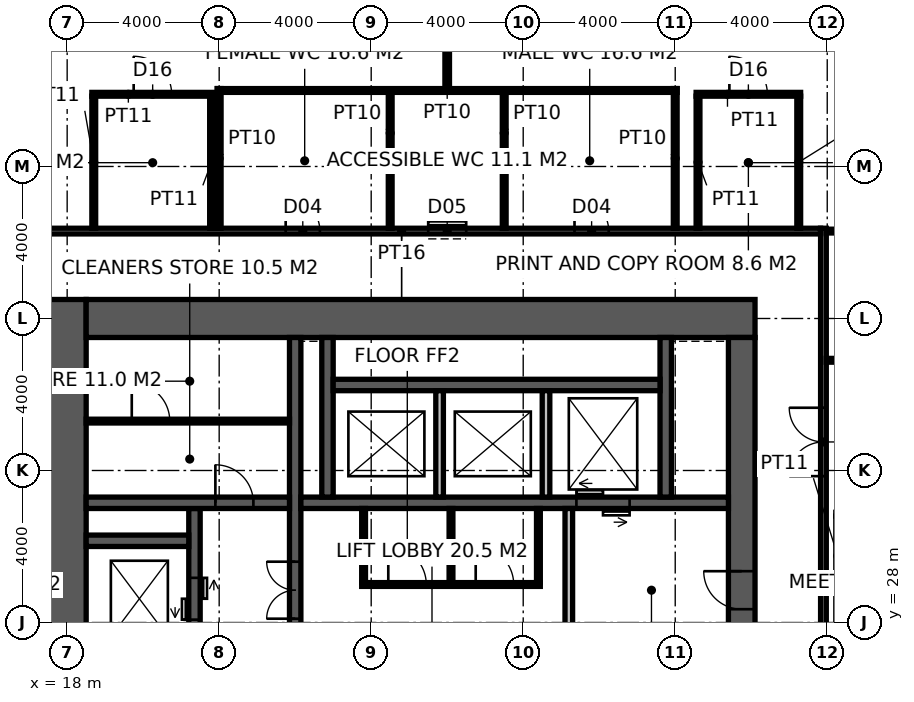
"""IFC4 building model, lengths in metres.
Left out: names, types, materials, properties, quantities, classifications, styles, units other than length and angle.
Written with IfcOpenShell. Run it as: python <this file> out.ifc"""

import sys

from ifc_helpers import new_model, si_unit, direction, frame, frame_2d, origin, place, context, subcontext, project, spatial, rectangle, extrude, element, fill, save


model = new_model("IFC4")
c1 = context("Model", 3, precision=1e-05, world=origin(), true_north=direction((0.0, 1.0)))
c2 = subcontext(c1, "Body", "Model", "MODEL_VIEW")
j1 = project(units=[si_unit("LENGTHUNIT", "METRE"), si_unit("PLANEANGLEUNIT", "RADIAN")], contexts=[c1])
p1 = place(None, origin())
s1 = spatial("IfcSite", under=j1, at=p1, CompositionType="ELEMENT")
p2 = place(p1, origin())
s2 = spatial("IfcBuilding", under=s1, at=p2, CompositionType="ELEMENT")
p3 = place(p2, frame((0.0, 0.0, 101.4)))
s3 = spatial("IfcBuildingStorey", under=s2, at=p3, CompositionType="ELEMENT", Elevation=101.4)
p4 = place(p3, frame((18.0, 17.5, -0.15), z_axis=(0.0, 0.0, 1.0), x_axis=(0.0, 1.0, 0.0)))
e1 = element("IfcWall", 1, at=p4, inside=s3, PredefinedType="SHEAR", context=c2, shape_type="SweptSolid", body=[
    extrude(rectangle(XDim=19.0, YDim=1.0, at=frame_2d((9.5, 0.0))), origin(), (0.0, 0.0, 1.0), 4.0),
])
p5 = place(p3, frame((18.5, 36.0, -0.15), z_axis=(0.0, 0.0, 1.0), x_axis=(1.0, 0.0, 0.0)))
e2 = element("IfcWall", 2, at=p5, inside=s3, PredefinedType="SHEAR", context=c2, shape_type="SweptSolid", body=[
    extrude(rectangle(XDim=17.6, YDim=1.0, at=frame_2d((8.8, 0.0))), origin(), (0.0, 0.0, 1.0), 4.0),
])
p6 = place(p3, frame((35.75, 18.5, -0.15), z_axis=(0.0, 0.0, 1.0), x_axis=(0.0, 1.0, 0.0)))
e3 = element("IfcWall", 3, at=p6, inside=s3, PredefinedType="SHEAR", context=c2, shape_type="SweptSolid", body=[
    extrude(rectangle(XDim=17.0, YDim=0.7, at=frame_2d((8.5, 0.0))), origin(), (0.0, 0.0, 1.0), 4.0),
])
p7 = place(p6, frame((9.85, 0.0, 0.15)))
e4 = element("IfcOpeningElement", 4, at=p7, cuts=e3, PredefinedType="OPENING", context=c2, shape_type="SweptSolid", body=[
    extrude(rectangle(XDim=1.0, YDim=2.2, at=frame_2d((0.5, 1.1))), frame((0.0, 0.36, 0.0), z_axis=(0.0, -1.0, 0.0), x_axis=(1.0, 0.0, 0.0)), (0.0, 0.0, 1.0), 0.72),
])
p8 = place(p3, frame((24.0, 18.5, -0.15), z_axis=(0.0, 0.0, 1.0), x_axis=(0.0, 1.0, 0.0)))
e5 = element("IfcWall", 5, at=p8, inside=s3, PredefinedType="SHEAR", context=c2, shape_type="SweptSolid", body=[
    extrude(rectangle(XDim=17.0, YDim=0.3, at=frame_2d((8.5, 0.0))), origin(), (0.0, 0.0, 1.0), 4.0),
])
p9 = place(p8, frame((9.6, 0.0, 0.15)))
e6 = element("IfcOpeningElement", 6, at=p9, cuts=e5, PredefinedType="OPENING", context=c2, shape_type="SweptSolid", body=[
    extrude(rectangle(XDim=1.5, YDim=2.4, at=frame_2d((0.75, 1.2))), frame((0.0, 0.16, 0.0), z_axis=(0.0, -1.0, 0.0), x_axis=(1.0, 0.0, 0.0)), (0.0, 0.0, 1.0), 0.32),
])
p10 = place(p3, frame((24.15, 31.15, -0.15), z_axis=(0.0, 0.0, 1.0), x_axis=(1.0, 0.0, 0.0)))
e7 = element("IfcWall", 7, at=p10, inside=s3, PredefinedType="SHEAR", context=c2, shape_type="SweptSolid", body=[
    extrude(rectangle(XDim=11.25, YDim=0.3, at=frame_2d((5.625, 0.0))), origin(), (0.0, 0.0, 1.0), 4.0),
])
p11 = place(p10, frame((7.25, 0.0, 0.15)))
e8 = element("IfcOpeningElement", 8, at=p11, cuts=e7, PredefinedType="OPENING", context=c2, shape_type="SweptSolid", body=[
    extrude(rectangle(XDim=1.4, YDim=2.4, at=frame_2d((0.7, 1.2))), frame((0.0, 0.16, 0.0), z_axis=(0.0, -1.0, 0.0), x_axis=(1.0, 0.0, 0.0)), (0.0, 0.0, 1.0), 0.32),
])
p12 = place(p3, frame((21.35, 18.5, -0.15), z_axis=(0.0, 0.0, 1.0), x_axis=(0.0, 1.0, 0.0)))
e9 = element("IfcWall", 9, at=p12, inside=s3, PredefinedType="SHEAR", context=c2, shape_type="SweptSolid", body=[
    extrude(rectangle(XDim=12.5, YDim=0.3, at=frame_2d((6.25, 0.0))), origin(), (0.0, 0.0, 1.0), 4.0),
])
p13 = place(p12, frame((0.875, 0.0, 0.15)))
e10 = element("IfcOpeningElement", 10, at=p13, cuts=e9, PredefinedType="OPENING", context=c2, shape_type="SweptSolid", body=[
    extrude(rectangle(XDim=1.1, YDim=2.2, at=frame_2d((0.55, 1.1))), frame((0.0, 0.16, 0.0), z_axis=(0.0, -1.0, 0.0), x_axis=(1.0, 0.0, 0.0)), (0.0, 0.0, 1.0), 0.32),
])
p14 = place(p12, frame((3.825, 0.0, 0.15)))
e11 = element("IfcOpeningElement", 11, at=p14, cuts=e9, PredefinedType="OPENING", context=c2, shape_type="SweptSolid", body=[
    extrude(rectangle(XDim=1.1, YDim=2.2, at=frame_2d((0.55, 1.1))), frame((0.0, 0.16, 0.0), z_axis=(0.0, -1.0, 0.0), x_axis=(1.0, 0.0, 0.0)), (0.0, 0.0, 1.0), 0.32),
])
p15 = place(p12, frame((6.675, 0.0, 0.15)))
e12 = element("IfcOpeningElement", 12, at=p15, cuts=e9, PredefinedType="OPENING", context=c2, shape_type="SweptSolid", body=[
    extrude(rectangle(XDim=1.1, YDim=2.2, at=frame_2d((0.55, 1.1))), frame((0.0, 0.16, 0.0), z_axis=(0.0, -1.0, 0.0), x_axis=(1.0, 0.0, 0.0)), (0.0, 0.0, 1.0), 0.32),
])
p16 = place(p12, frame((9.575, 0.0, 0.15)))
e13 = element("IfcOpeningElement", 13, at=p16, cuts=e9, PredefinedType="OPENING", context=c2, shape_type="SweptSolid", body=[
    extrude(rectangle(XDim=1.1, YDim=2.2, at=frame_2d((0.55, 1.1))), frame((0.0, 0.16, 0.0), z_axis=(0.0, -1.0, 0.0), x_axis=(1.0, 0.0, 0.0)), (0.0, 0.0, 1.0), 0.32),
])
p17 = place(p3, frame((18.5, 31.15, -0.15), z_axis=(0.0, 0.0, 1.0), x_axis=(1.0, 0.0, 0.0)))
e14 = element("IfcWall", 14, at=p17, inside=s3, PredefinedType="SHEAR", context=c2, shape_type="SweptSolid", body=[
    extrude(rectangle(XDim=5.35, YDim=0.3, at=frame_2d((2.675, 0.0))), origin(), (0.0, 0.0, 1.0), 4.0),
])
p18 = place(p17, frame((3.4, 0.0, 0.15)))
e15 = element("IfcOpeningElement", 15, at=p18, cuts=e14, PredefinedType="OPENING", context=c2, shape_type="SweptSolid", body=[
    extrude(rectangle(XDim=1.0, YDim=2.2, at=frame_2d((0.5, 1.1))), frame((0.0, 0.16, 0.0), z_axis=(0.0, -1.0, 0.0), x_axis=(1.0, 0.0, 0.0)), (0.0, 0.0, 1.0), 0.32),
])
p19 = place(p3, frame((18.5, 30.15, -0.15), z_axis=(0.0, 0.0, 1.0), x_axis=(1.0, 0.0, 0.0)))
e16 = element("IfcWall", 16, at=p19, inside=s3, PredefinedType="SHEAR", context=c2, shape_type="SweptSolid", body=[
    extrude(rectangle(XDim=2.7, YDim=0.3, at=frame_2d((1.35, 0.0))), origin(), (0.0, 0.0, 1.0), 4.0),
])
for number, where, z_axis, x_axis in (
    (17, (24.85, 31.3, -0.15), (0.0, 0.0, 1.0), (0.0, 1.0, 0.0)),
    (18, (33.75, 31.3, -0.15), (0.0, 0.0, 1.0), (0.0, 1.0, 0.0)),
):
    element("IfcWall", number, at=place(p3, frame(where, z_axis=z_axis, x_axis=x_axis)), inside=s3, PredefinedType="SHEAR", context=c2, shape_type="SweptSolid", body=[
        extrude(rectangle(XDim=4.2, YDim=0.3, at=frame_2d((2.1, 0.0))), origin(), (0.0, 0.0, 1.0), 4.0),
    ])
p20 = place(p3, frame((25.0, 34.25, -0.15), z_axis=(0.0, 0.0, 1.0), x_axis=(1.0, 0.0, 0.0)))
e19 = element("IfcWall", 19, at=p20, inside=s3, PredefinedType="SHEAR", context=c2, shape_type="SweptSolid", body=[
    extrude(rectangle(XDim=8.6, YDim=0.3, at=frame_2d((4.3, 0.0))), origin(), (0.0, 0.0, 1.0), 4.0),
])
for number, where, z_axis, x_axis in (
    (20, (27.8, 31.3, -0.15), (0.0, 0.0, 1.0), (0.0, 1.0, 0.0)),
    (21, (30.6, 31.3, -0.15), (0.0, 0.0, 1.0), (0.0, 1.0, 0.0)),
):
    element("IfcWall", number, at=place(p3, frame(where, z_axis=z_axis, x_axis=x_axis)), inside=s3, PredefinedType="SOLIDWALL", context=c2, shape_type="SweptSolid", body=[
        extrude(rectangle(XDim=2.8, YDim=0.2, at=frame_2d((1.4, 0.0))), origin(), (0.0, 0.0, 1.0), 4.0),
    ])
p21 = place(p3, frame((31.2, 26.7, 0.0), z_axis=(0.0, 0.0, 1.0), x_axis=(0.0, 1.0, 0.0)))
e22 = element("IfcWall", 22, at=p21, inside=s3, PredefinedType="SOLIDWALL", context=c2, shape_type="SweptSolid", body=[
    extrude(rectangle(XDim=4.3, YDim=0.2, at=frame_2d((2.15, 0.0))), origin(), (0.0, 0.0, 1.0), 3.85),
])
p22 = place(p3, frame((18.5, 33.3, 0.0), z_axis=(0.0, 0.0, 1.0), x_axis=(1.0, 0.0, 0.0)))
e23 = element("IfcWall", 23, at=p22, inside=s3, PredefinedType="PARTITIONING", context=c2, shape_type="SweptSolid", body=[
    extrude(rectangle(XDim=5.35, YDim=0.1, at=frame_2d((2.675, 0.0))), origin(), (0.0, 0.0, 1.0), 3.85),
])
p23 = place(p22, frame((1.2, 0.0, 0.0)))
e24 = element("IfcOpeningElement", 24, at=p23, cuts=e23, PredefinedType="OPENING", context=c2, shape_type="SweptSolid", body=[
    extrude(rectangle(XDim=1.0, YDim=2.2, at=frame_2d((0.5, 1.1))), frame((0.0, 0.06, 0.0), z_axis=(0.0, -1.0, 0.0), x_axis=(1.0, 0.0, 0.0)), (0.0, 0.0, 1.0), 0.12),
])
p24 = place(p3, frame((25.75, 29.0, 0.0), z_axis=(0.0, 0.0, 1.0), x_axis=(1.0, 0.0, 0.0)))
e25 = element("IfcWall", 25, at=p24, inside=s3, PredefinedType="PARTITIONING", context=c2, shape_type="SweptSolid", body=[
    extrude(rectangle(XDim=4.7, YDim=0.1, at=frame_2d((2.35, 0.0))), origin(), (0.0, 0.0, 1.0), 3.85),
])
p25 = place(p24, frame((0.7, 0.0, 0.0)))
e26 = element("IfcOpeningElement", 26, at=p25, cuts=e25, PredefinedType="OPENING", context=c2, shape_type="SweptSolid", body=[
    extrude(rectangle(XDim=1.0, YDim=2.2, at=frame_2d((0.5, 1.1))), frame((0.0, 0.06, 0.0), z_axis=(0.0, -1.0, 0.0), x_axis=(1.0, 0.0, 0.0)), (0.0, 0.0, 1.0), 0.12),
])
p26 = place(p24, frame((3.0, 0.0, 0.0)))
e27 = element("IfcOpeningElement", 27, at=p26, cuts=e25, PredefinedType="OPENING", context=c2, shape_type="SweptSolid", body=[
    extrude(rectangle(XDim=1.0, YDim=2.2, at=frame_2d((0.5, 1.1))), frame((0.0, 0.06, 0.0), z_axis=(0.0, -1.0, 0.0), x_axis=(1.0, 0.0, 0.0)), (0.0, 0.0, 1.0), 0.12),
])
for number, where, z_axis, x_axis in (
    (28, (25.8, 29.05, 0.0), (0.0, 0.0, 1.0), (0.0, 1.0, 0.0)),
    (29, (30.4, 29.05, 0.0), (0.0, 0.0, 1.0), (0.0, 1.0, 0.0)),
    (30, (28.1, 29.05, 0.0), (0.0, 0.0, 1.0), (0.0, 1.0, 0.0)),
):
    element("IfcWall", number, at=place(p3, frame(where, z_axis=z_axis, x_axis=x_axis)), inside=s3, PredefinedType="PARTITIONING", context=c2, shape_type="SweptSolid", body=[
        extrude(rectangle(XDim=1.95, YDim=0.1, at=frame_2d((0.975, 0.0))), origin(), (0.0, 0.0, 1.0), 3.85),
    ])
p27 = place(p3, frame((37.9, 15.625, 0.0), z_axis=(0.0, 0.0, 1.0), x_axis=(0.0, 1.0, 0.0)))
e31 = element("IfcWall", 31, at=p27, inside=s3, PredefinedType="PARTITIONING", context=c2, shape_type="SweptSolid", body=[
    extrude(rectangle(XDim=22.75, YDim=0.15, at=frame_2d((11.375, 0.0))), origin(), (0.0, 0.0, 1.0), 2.65),
])
p28 = place(p27, frame((4.974, 0.0, 0.0)))
e32 = element("IfcOpeningElement", 32, at=p28, cuts=e31, PredefinedType="OPENING", context=c2, shape_type="SweptSolid", body=[
    extrude(rectangle(XDim=1.8, YDim=2.4, at=frame_2d((0.9, 1.2))), frame((0.0, 0.085, 0.0), z_axis=(0.0, -1.0, 0.0), x_axis=(1.0, 0.0, 0.0)), (0.0, 0.0, 1.0), 0.17),
])
p29 = place(p27, frame((16.226, 0.0, 0.0)))
e33 = element("IfcOpeningElement", 33, at=p29, cuts=e31, PredefinedType="OPENING", context=c2, shape_type="SweptSolid", body=[
    extrude(rectangle(XDim=1.8, YDim=2.4, at=frame_2d((0.9, 1.2))), frame((0.0, 0.085, 0.0), z_axis=(0.0, -1.0, 0.0), x_axis=(1.0, 0.0, 0.0)), (0.0, 0.0, 1.0), 0.17),
])
p30 = place(p3, frame((15.775, 38.3, 0.0), z_axis=(0.0, 0.0, 1.0), x_axis=(1.0, 0.0, 0.0)))
e34 = element("IfcWall", 34, at=p30, inside=s3, PredefinedType="PARTITIONING", context=c2, shape_type="SweptSolid", body=[
    extrude(rectangle(XDim=22.05, YDim=0.15, at=frame_2d((11.025, 0.0))), origin(), (0.0, 0.0, 1.0), 3.85),
])
p31 = place(p30, frame((7.975, 0.0, 0.0)))
e35 = element("IfcOpeningElement", 35, at=p31, cuts=e34, PredefinedType="OPENING", context=c2, shape_type="SweptSolid", body=[
    extrude(rectangle(XDim=0.9, YDim=2.1, at=frame_2d((0.45, 1.05))), frame((0.0, 0.085, 0.0), z_axis=(0.0, -1.0, 0.0), x_axis=(1.0, 0.0, 0.0)), (0.0, 0.0, 1.0), 0.17),
])
p32 = place(p30, frame((11.725, 0.0, 0.0)))
e36 = element("IfcOpeningElement", 36, at=p32, cuts=e34, PredefinedType="OPENING", context=c2, shape_type="SweptSolid", body=[
    extrude(rectangle(XDim=1.0, YDim=2.1, at=frame_2d((0.5, 1.05))), frame((0.0, 0.085, 0.0), z_axis=(0.0, -1.0, 0.0), x_axis=(1.0, 0.0, 0.0)), (0.0, 0.0, 1.0), 0.17),
])
p33 = place(p30, frame((15.575, 0.0, 0.0)))
e37 = element("IfcOpeningElement", 37, at=p33, cuts=e34, PredefinedType="OPENING", context=c2, shape_type="SweptSolid", body=[
    extrude(rectangle(XDim=0.9, YDim=2.1, at=frame_2d((0.45, 1.05))), frame((0.0, 0.085, 0.0), z_axis=(0.0, -1.0, 0.0), x_axis=(1.0, 0.0, 0.0)), (0.0, 0.0, 1.0), 0.17),
])
for number, where, z_axis, x_axis in (
    (38, (22.0, 38.375, 0.0), (0.0, 0.0, 1.0), (0.0, 1.0, 0.0)),
    (39, (34.0, 38.375, 0.0), (0.0, 0.0, 1.0), (0.0, 1.0, 0.0)),
):
    element("IfcWall", number, at=place(p3, frame(where, z_axis=z_axis, x_axis=x_axis)), inside=s3, PredefinedType="PARTITIONING", context=c2, shape_type="SweptSolid", body=[
        extrude(rectangle(XDim=3.675, YDim=0.1, at=frame_2d((1.837, 0.0))), origin(), (0.0, 0.0, 1.0), 2.65),
    ])
p34 = place(p3, frame((21.95, 42.0, 0.0), z_axis=(0.0, 0.0, 1.0), x_axis=(1.0, 0.0, 0.0)))
e40 = element("IfcWall", 40, at=p34, inside=s3, PredefinedType="PARTITIONING", context=c2, shape_type="SweptSolid", body=[
    extrude(rectangle(XDim=12.1, YDim=0.1, at=frame_2d((6.05, 0.0))), origin(), (0.0, 0.0, 1.0), 3.85),
])
for number, where, z_axis, x_axis in (
    (41, (26.5, 38.375, 0.0), (0.0, 0.0, 1.0), (0.0, 1.0, 0.0)),
    (42, (29.5, 38.375, 0.0), (0.0, 0.0, 1.0), (0.0, 1.0, 0.0)),
):
    element("IfcWall", number, at=place(p3, frame(where, z_axis=z_axis, x_axis=x_axis)), inside=s3, PredefinedType="PARTITIONING", context=c2, shape_type="SweptSolid", body=[
        extrude(rectangle(XDim=3.575, YDim=0.1, at=frame_2d((1.788, 0.0))), origin(), (0.0, 0.0, 1.0), 2.65),
    ])
p35 = place(p3, frame((28.0, 42.05, 0.0), z_axis=(0.0, 0.0, 1.0), x_axis=(0.0, 1.0, 0.0)))
e43 = element("IfcWall", 43, at=p35, inside=s3, PredefinedType="PARTITIONING", context=c2, shape_type="SweptSolid", body=[
    extrude(rectangle(XDim=5.65, YDim=0.12, at=frame_2d((2.825, 0.0))), origin(), (0.0, 0.0, 1.0), 3.85),
])
for number, where, z_axis, x_axis in (
    (44, (37.975, 34.9, 0.0), (0.0, 0.0, 1.0), (1.0, 0.0, 0.0)),
    (45, (37.975, 38.3, 0.0), (0.0, 0.0, 1.0), (1.0, 0.0, 0.0)),
):
    element("IfcWall", number, at=place(p3, frame(where, z_axis=z_axis, x_axis=x_axis)), inside=s3, PredefinedType="PARTITIONING", context=c2, shape_type="SweptSolid", body=[
        extrude(rectangle(XDim=4.775, YDim=0.1, at=frame_2d((2.387, 0.0))), origin(), (0.0, 0.0, 1.0), 3.85),
    ])
p36 = place(p3, frame((18.65, 41.9, 0.0), z_axis=(0.0, 0.0, 1.0), x_axis=(1.0, 0.0, 0.0)))
e46 = element("IfcWall", 46, at=p36, inside=s3, PredefinedType="PARTITIONING", context=c2, shape_type="SweptSolid", body=[
    extrude(rectangle(XDim=3.2, YDim=0.1, at=frame_2d((1.6, 0.0))), origin(), (0.0, 0.0, 1.0), 3.85),
])
p37 = place(p36, frame((1.1, 0.0, 0.0)))
e47 = element("IfcOpeningElement", 47, at=p37, cuts=e46, PredefinedType="OPENING", context=c2, shape_type="SweptSolid", body=[
    extrude(rectangle(XDim=1.0, YDim=2.2, at=frame_2d((0.5, 1.1))), frame((0.0, 0.06, 0.0), z_axis=(0.0, -1.0, 0.0), x_axis=(1.0, 0.0, 0.0)), (0.0, 0.0, 1.0), 0.12),
])
p38 = place(p3, frame((34.55, 41.9, 0.0), z_axis=(0.0, 0.0, 1.0), x_axis=(1.0, 0.0, 0.0)))
e48 = element("IfcWall", 48, at=p38, inside=s3, PredefinedType="PARTITIONING", context=c2, shape_type="SweptSolid", body=[
    extrude(rectangle(XDim=2.75, YDim=0.1, at=frame_2d((1.375, 0.0))), origin(), (0.0, 0.0, 1.0), 3.85),
])
p39 = place(p38, frame((0.875, 0.0, 0.0)))
e49 = element("IfcOpeningElement", 49, at=p39, cuts=e48, PredefinedType="OPENING", context=c2, shape_type="SweptSolid", body=[
    extrude(rectangle(XDim=1.0, YDim=2.2, at=frame_2d((0.5, 1.1))), frame((0.0, 0.06, 0.0), z_axis=(0.0, -1.0, 0.0), x_axis=(1.0, 0.0, 0.0)), (0.0, 0.0, 1.0), 0.12),
])
p40 = place(p3, frame((18.7, 38.375, 0.0), z_axis=(0.0, 0.0, 1.0), x_axis=(0.0, 1.0, 0.0)))
e50 = element("IfcWall", 50, at=p40, inside=s3, PredefinedType="PARTITIONING", context=c2, shape_type="SweptSolid", body=[
    extrude(rectangle(XDim=3.475, YDim=0.1, at=frame_2d((1.738, 0.0))), origin(), (0.0, 0.0, 1.0), 3.85),
])
for number, where, z_axis, x_axis in (
    (51, (21.8, 38.375, 0.0), (0.0, 0.0, 1.0), (0.0, 1.0, 0.0)),
    (52, (34.6, 38.375, 0.0), (0.0, 0.0, 1.0), (0.0, 1.0, 0.0)),
):
    element("IfcWall", number, at=place(p3, frame(where, z_axis=z_axis, x_axis=x_axis)), inside=s3, PredefinedType="PARTITIONING", context=c2, shape_type="SweptSolid", body=[
        extrude(rectangle(XDim=3.475, YDim=0.1, at=frame_2d((1.738, 0.0))), origin(), (0.0, 0.0, 1.0), 2.65),
    ])
p41 = place(p3, frame((37.25, 38.375, 0.0), z_axis=(0.0, 0.0, 1.0), x_axis=(0.0, 1.0, 0.0)))
e53 = element("IfcWall", 53, at=p41, inside=s3, PredefinedType="PARTITIONING", context=c2, shape_type="SweptSolid", body=[
    extrude(rectangle(XDim=3.475, YDim=0.1, at=frame_2d((1.738, 0.0))), origin(), (0.0, 0.0, 1.0), 3.85),
])
p42 = place(p7, origin())
e54 = element("IfcDoor", 54, at=p42, inside=s3, OperationType="SINGLE_SWING_RIGHT", PredefinedType="DOOR", context=c2, shape_type="SweptSolid", body=[
    extrude(rectangle(XDim=1.0, YDim=2.2, at=frame_2d((0.5, 1.1))), frame((0.0, 0.025, 0.0), z_axis=(0.0, -1.0, 0.0), x_axis=(1.0, 0.0, 0.0)), (0.0, 0.0, 1.0), 0.05),
])
fill(e4, e54)
p43 = place(p9, origin())
e55 = element("IfcDoor", 55, at=p43, inside=s3, OperationType="DOUBLE_DOOR_DOUBLE_SWING", PredefinedType="DOOR", context=c2, shape_type="SweptSolid", body=[
    extrude(rectangle(XDim=1.5, YDim=2.4, at=frame_2d((0.75, 1.2))), frame((0.0, 0.025, 0.0), z_axis=(0.0, -1.0, 0.0), x_axis=(1.0, 0.0, 0.0)), (0.0, 0.0, 1.0), 0.05),
])
fill(e6, e55)
p44 = place(p18, origin())
e56 = element("IfcDoor", 56, at=p44, inside=s3, OperationType="SINGLE_SWING_LEFT", PredefinedType="DOOR", context=c2, shape_type="SweptSolid", body=[
    extrude(rectangle(XDim=1.0, YDim=2.2, at=frame_2d((0.5, 1.1))), frame((0.0, 0.025, 0.0), z_axis=(0.0, -1.0, 0.0), x_axis=(1.0, 0.0, 0.0)), (0.0, 0.0, 1.0), 0.05),
])
fill(e15, e56)
p45 = place(p23, origin())
e57 = element("IfcDoor", 57, at=p45, inside=s3, OperationType="SINGLE_SWING_LEFT", PredefinedType="DOOR", context=c2, shape_type="SweptSolid", body=[
    extrude(rectangle(XDim=1.0, YDim=2.2, at=frame_2d((0.5, 1.1))), frame((0.0, 0.025, 0.0), z_axis=(0.0, -1.0, 0.0), x_axis=(1.0, 0.0, 0.0)), (0.0, 0.0, 1.0), 0.05),
])
fill(e24, e57)
p46 = place(p25, origin())
e58 = element("IfcDoor", 58, at=p46, inside=s3, OperationType="SINGLE_SWING_LEFT", PredefinedType="DOOR", context=c2, shape_type="SweptSolid", body=[
    extrude(rectangle(XDim=1.0, YDim=2.2, at=frame_2d((0.5, 1.1))), frame((0.0, 0.025, 0.0), z_axis=(0.0, -1.0, 0.0), x_axis=(1.0, 0.0, 0.0)), (0.0, 0.0, 1.0), 0.05),
])
fill(e26, e58)
p47 = place(p26, origin())
e59 = element("IfcDoor", 59, at=p47, inside=s3, OperationType="SINGLE_SWING_LEFT", PredefinedType="DOOR", context=c2, shape_type="SweptSolid", body=[
    extrude(rectangle(XDim=1.0, YDim=2.2, at=frame_2d((0.5, 1.1))), frame((0.0, 0.025, 0.0), z_axis=(0.0, -1.0, 0.0), x_axis=(1.0, 0.0, 0.0)), (0.0, 0.0, 1.0), 0.05),
])
fill(e27, e59)
p48 = place(p31, origin())
e60 = element("IfcDoor", 60, at=p48, inside=s3, OperationType="SINGLE_SWING_LEFT", PredefinedType="DOOR", context=c2, shape_type="SweptSolid", body=[
    extrude(rectangle(XDim=0.9, YDim=2.1, at=frame_2d((0.45, 1.05))), frame((0.0, 0.025, 0.0), z_axis=(0.0, -1.0, 0.0), x_axis=(1.0, 0.0, 0.0)), (0.0, 0.0, 1.0), 0.05),
])
fill(e35, e60)
p49 = place(p32, origin())
e61 = element("IfcDoor", 61, at=p49, inside=s3, OperationType="SLIDING_TO_LEFT", PredefinedType="DOOR", context=c2, shape_type="SweptSolid", body=[
    extrude(rectangle(XDim=1.0, YDim=2.1, at=frame_2d((0.5, 1.05))), frame((0.0, 0.025, 0.0), z_axis=(0.0, -1.0, 0.0), x_axis=(1.0, 0.0, 0.0)), (0.0, 0.0, 1.0), 0.05),
])
fill(e36, e61)
p50 = place(p33, origin())
e62 = element("IfcDoor", 62, at=p50, inside=s3, OperationType="SINGLE_SWING_LEFT", PredefinedType="DOOR", context=c2, shape_type="SweptSolid", body=[
    extrude(rectangle(XDim=0.9, YDim=2.1, at=frame_2d((0.45, 1.05))), frame((0.0, 0.025, 0.0), z_axis=(0.0, -1.0, 0.0), x_axis=(1.0, 0.0, 0.0)), (0.0, 0.0, 1.0), 0.05),
])
fill(e37, e62)
p51 = place(p29, origin())
e63 = element("IfcDoor", 63, at=p51, inside=s3, OperationType="DOUBLE_DOOR_DOUBLE_SWING", PredefinedType="DOOR", context=c2, shape_type="SweptSolid", body=[
    extrude(rectangle(XDim=1.8, YDim=2.4, at=frame_2d((0.9, 1.2))), frame((0.0, 0.025, 0.0), z_axis=(0.0, -1.0, 0.0), x_axis=(1.0, 0.0, 0.0)), (0.0, 0.0, 1.0), 0.05),
])
fill(e33, e63)
p52 = place(p37, origin())
e64 = element("IfcDoor", 64, at=p52, inside=s3, OperationType="SINGLE_SWING_LEFT", PredefinedType="DOOR", context=c2, shape_type="SweptSolid", body=[
    extrude(rectangle(XDim=1.0, YDim=2.2, at=frame_2d((0.5, 1.1))), frame((0.0, 0.025, 0.0), z_axis=(0.0, -1.0, 0.0), x_axis=(1.0, 0.0, 0.0)), (0.0, 0.0, 1.0), 0.05),
])
fill(e47, e64)
p53 = place(p39, origin())
e65 = element("IfcDoor", 65, at=p53, inside=s3, OperationType="SINGLE_SWING_LEFT", PredefinedType="DOOR", context=c2, shape_type="SweptSolid", body=[
    extrude(rectangle(XDim=1.0, YDim=2.2, at=frame_2d((0.5, 1.1))), frame((0.0, 0.025, 0.0), z_axis=(0.0, -1.0, 0.0), x_axis=(1.0, 0.0, 0.0)), (0.0, 0.0, 1.0), 0.05),
])
fill(e49, e65)
p54 = place(p11, origin())
e66 = element("IfcDoor", 66, at=p54, inside=s3, OperationType="DOUBLE_DOOR_SLIDING", PredefinedType="DOOR", context=c2, shape_type="SweptSolid", body=[
    extrude(rectangle(XDim=1.4, YDim=2.4, at=frame_2d((0.7, 1.2))), frame((0.0, 0.025, 0.0), z_axis=(0.0, -1.0, 0.0), x_axis=(1.0, 0.0, 0.0)), (0.0, 0.0, 1.0), 0.05),
])
fill(e8, e66)
p55 = place(p16, origin())
e67 = element("IfcDoor", 67, at=p55, inside=s3, OperationType="DOUBLE_DOOR_SLIDING", PredefinedType="DOOR", context=c2, shape_type="SweptSolid", body=[
    extrude(rectangle(XDim=1.1, YDim=2.2, at=frame_2d((0.55, 1.1))), frame((0.0, 0.025, 0.0), z_axis=(0.0, -1.0, 0.0), x_axis=(1.0, 0.0, 0.0)), (0.0, 0.0, 1.0), 0.05),
])
fill(e13, e67)
save(model, sys.argv[1])
